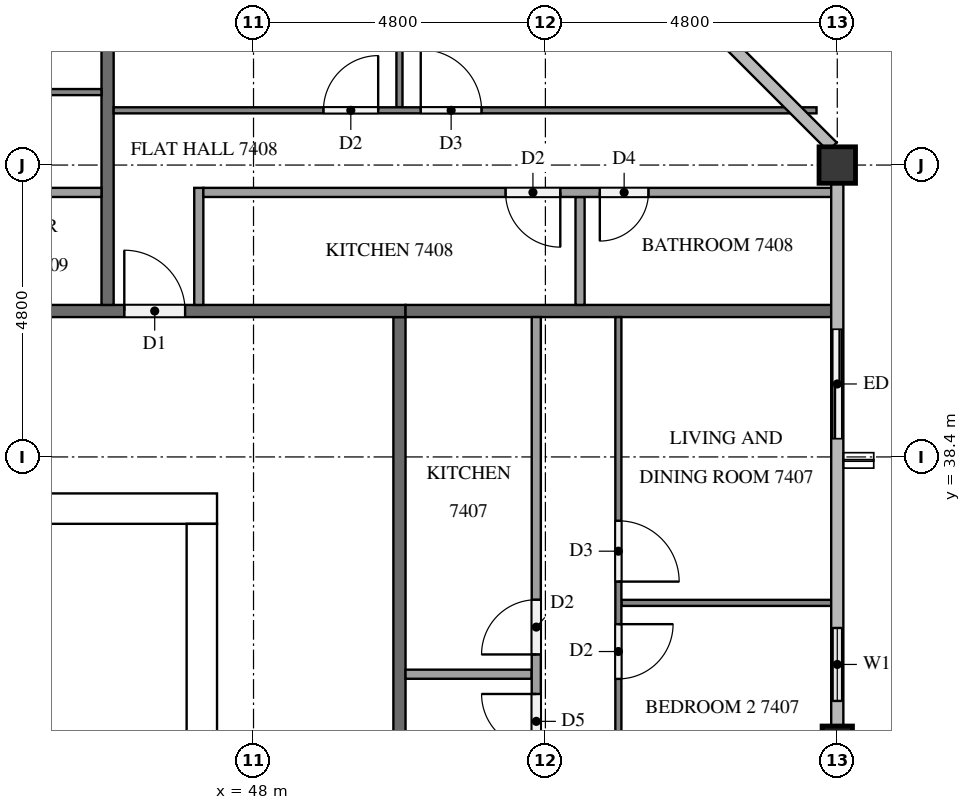
"""IFC4 building model, lengths in metres.
Left out: names, types, materials, properties, quantities, classifications, styles, units other than length and angle.
Written with IfcOpenShell. Run it as: python <this file> out.ifc"""

import sys

from ifc_helpers import new_model, si_unit, direction, frame, frame_2d, origin, origin_2d, place, context, subcontext, project, spatial, rectangle, extrude, element, fill, save


model = new_model("IFC4")
c1 = context("Model", 3, precision=1e-05, world=origin(), true_north=direction((0.0, 1.0)))
c2 = subcontext(c1, "Body", "Model", "MODEL_VIEW")
j1 = project(units=[si_unit("LENGTHUNIT", "METRE"), si_unit("PLANEANGLEUNIT", "RADIAN")], contexts=[c1])
p1 = place(None, origin())
s1 = spatial("IfcSite", under=j1, at=p1, CompositionType="ELEMENT")
p2 = place(p1, origin())
s2 = spatial("IfcBuilding", under=s1, at=p2, CompositionType="ELEMENT")
p3 = place(p2, frame((0.0, 0.0, 282.6)))
s3 = spatial("IfcBuildingStorey", under=s2, at=p3, CompositionType="ELEMENT", Elevation=282.6)
p4 = place(p3, frame((15.0, 37.55, 0.0), z_axis=(0.0, 0.0, 1.0), x_axis=(1.0, 0.0, 0.0)))
e1 = element("IfcWall", 1, at=p4, inside=s3, PredefinedType="SHEAR", context=c2, shape_type="SweptSolid", body=[
    extrude(rectangle(XDim=32.4, YDim=0.5, at=frame_2d((16.2, 0.0))), origin(), (0.0, 0.0, 1.0), 3.2),
])
p5 = place(p4, frame((15.3, 0.0, 0.0)))
e2 = element("IfcOpeningElement", 2, at=p5, cuts=e1, PredefinedType="OPENING", context=c2, shape_type="SweptSolid", body=[
    extrude(rectangle(XDim=1.8, YDim=2.1, at=frame_2d((0.9, 1.05))), frame((0.0, 0.26, 0.0), z_axis=(0.0, -1.0, 0.0), x_axis=(1.0, 0.0, 0.0)), (0.0, 0.0, 1.0), 0.52),
])
p6 = place(p4, frame((1.282, 0.0, 0.0)))
e3 = element("IfcOpeningElement", 3, at=p6, cuts=e1, PredefinedType="OPENING", context=c2, shape_type="SweptSolid", body=[
    extrude(rectangle(XDim=1.0, YDim=2.1, at=frame_2d((0.5, 1.05))), frame((0.0, 0.26, 0.0), z_axis=(0.0, -1.0, 0.0), x_axis=(1.0, 0.0, 0.0)), (0.0, 0.0, 1.0), 0.52),
])
p7 = place(p4, frame((5.082, 0.0, 0.0)))
e4 = element("IfcOpeningElement", 4, at=p7, cuts=e1, PredefinedType="OPENING", context=c2, shape_type="SweptSolid", body=[
    extrude(rectangle(XDim=1.0, YDim=2.1, at=frame_2d((0.5, 1.05))), frame((0.0, 0.26, 0.0), z_axis=(0.0, -1.0, 0.0), x_axis=(1.0, 0.0, 0.0)), (0.0, 0.0, 1.0), 0.52),
])
p8 = place(p3, frame((47.15, 15.5, 0.0), z_axis=(0.0, 0.0, 1.0), x_axis=(0.0, 1.0, 0.0)))
e5 = element("IfcWall", 5, at=p8, inside=s3, PredefinedType="SHEAR", context=c2, shape_type="SweptSolid", body=[
    extrude(rectangle(XDim=21.8, YDim=0.5, at=frame_2d((10.9, 0.0))), origin(), (0.0, 0.0, 1.0), 3.2),
])
p9 = place(p8, frame((10.6, 0.0, 0.0)))
e6 = element("IfcOpeningElement", 6, at=p9, cuts=e5, PredefinedType="OPENING", context=c2, shape_type="SweptSolid", body=[
    extrude(rectangle(XDim=1.2, YDim=2.1, at=frame_2d((0.6, 1.05))), frame((0.0, 0.26, 0.0), z_axis=(0.0, -1.0, 0.0), x_axis=(1.0, 0.0, 0.0)), (0.0, 0.0, 1.0), 0.52),
])
p10 = place(p3, frame((57.6, 33.6, 0.0), z_axis=(0.0, 0.0, 1.0), x_axis=(0.0, 1.0, 0.0)))
e7 = element("IfcColumn", 7, at=p10, inside=s3, PredefinedType="COLUMN", context=c2, shape_type="SweptSolid", body=[
    extrude(rectangle(XDim=0.75, YDim=0.5, at=origin_2d()), origin(), (0.0, 0.0, 1.0), 3.2),
])
p11 = place(p3, frame((57.6, 43.2, 0.0), z_axis=(0.0, 0.0, 1.0), x_axis=(1.0, 0.0, 0.0)))
e8 = element("IfcColumn", 8, at=p11, inside=s3, PredefinedType="COLUMN", context=c2, shape_type="SweptSolid", body=[
    extrude(rectangle(XDim=0.6, YDim=0.6, at=origin_2d()), origin(), (0.0, 0.0, 1.0), 3.2),
])
p12 = place(p3, frame((57.6, 33.975, 0.0), z_axis=(0.0, 0.0, 1.0), x_axis=(0.0, 1.0, 0.0)))
e9 = element("IfcWall", 9, at=p12, inside=s3, PredefinedType="SOLIDWALL", context=c2, shape_type="SweptSolid", body=[
    extrude(rectangle(XDim=2.025, YDim=0.15, at=frame_2d((1.012, 0.0))), origin(), (0.0, 0.0, 1.0), 3.2),
])
p13 = place(p12, frame((0.413, 0.0, 0.9)))
e10 = element("IfcOpeningElement", 10, at=p13, cuts=e9, PredefinedType="OPENING", context=c2, shape_type="SweptSolid", body=[
    extrude(rectangle(XDim=1.2, YDim=1.4, at=frame_2d((0.6, 0.7))), frame((0.0, 0.085, 0.0), z_axis=(0.0, -1.0, 0.0), x_axis=(1.0, 0.0, 0.0)), (0.0, 0.0, 1.0), 0.17),
])
p14 = place(p3, frame((57.6, 38.4, 0.0), z_axis=(0.0, 0.0, 1.0), x_axis=(0.0, 1.0, 0.0)))
e11 = element("IfcWall", 11, at=p14, inside=s3, PredefinedType="SOLIDWALL", context=c2, shape_type="SweptSolid", body=[
    extrude(rectangle(XDim=2.4, YDim=0.15, at=frame_2d((1.2, 0.0))), origin(), (0.0, 0.0, 1.0), 3.2),
])
p15 = place(p14, frame((0.3, 0.0, 0.0)))
e12 = element("IfcOpeningElement", 12, at=p15, cuts=e11, PredefinedType="OPENING", context=c2, shape_type="SweptSolid", body=[
    extrude(rectangle(XDim=1.8, YDim=2.4, at=frame_2d((0.9, 1.2))), frame((0.0, 0.085, 0.0), z_axis=(0.0, -1.0, 0.0), x_axis=(1.0, 0.0, 0.0)), (0.0, 0.0, 1.0), 0.17),
])
p16 = place(p3, frame((50.4, 40.7, 0.0), z_axis=(0.0, 0.0, 1.0), x_axis=(0.0, -1.0, 0.0)))
e13 = element("IfcWall", 13, at=p16, inside=s3, PredefinedType="PARTITIONING", context=c2, shape_type="SweptSolid", body=[
    extrude(rectangle(XDim=28.6, YDim=0.2, at=frame_2d((14.3, 0.0))), origin(), (0.0, 0.0, 1.0), 3.2),
])
p17 = place(p16, frame((27.425, 0.0, 0.0)))
e14 = element("IfcOpeningElement", 14, at=p17, cuts=e13, PredefinedType="OPENING", context=c2, shape_type="SweptSolid", body=[
    extrude(rectangle(XDim=1.0, YDim=2.1, at=frame_2d((0.5, 1.05))), frame((0.0, 0.11, 0.0), z_axis=(0.0, -1.0, 0.0), x_axis=(1.0, 0.0, 0.0)), (0.0, 0.0, 1.0), 0.22),
])
p18 = place(p16, frame((13.025, 0.0, 0.0)))
e15 = element("IfcOpeningElement", 15, at=p18, cuts=e13, PredefinedType="OPENING", context=c2, shape_type="SweptSolid", body=[
    extrude(rectangle(XDim=1.0, YDim=2.1, at=frame_2d((0.5, 1.05))), frame((0.0, 0.11, 0.0), z_axis=(0.0, -1.0, 0.0), x_axis=(1.0, 0.0, 0.0)), (0.0, 0.0, 1.0), 0.22),
])
p19 = place(p3, frame((11.9, 40.8, 0.0), z_axis=(0.0, 0.0, 1.0), x_axis=(1.0, 0.0, 0.0)))
e16 = element("IfcWall", 16, at=p19, inside=s3, PredefinedType="PARTITIONING", context=c2, shape_type="SweptSolid", body=[
    extrude(rectangle(XDim=38.6, YDim=0.2, at=frame_2d((19.3, 0.0))), origin(), (0.0, 0.0, 1.0), 3.2),
])
p20 = place(p19, frame((33.975, 0.0, 0.0)))
e17 = element("IfcOpeningElement", 17, at=p20, cuts=e16, PredefinedType="OPENING", context=c2, shape_type="SweptSolid", body=[
    extrude(rectangle(XDim=1.0, YDim=2.1, at=frame_2d((0.5, 1.05))), frame((0.0, 0.11, 0.0), z_axis=(0.0, -1.0, 0.0), x_axis=(1.0, 0.0, 0.0)), (0.0, 0.0, 1.0), 0.22),
])
p21 = place(p19, frame((14.725, 0.0, 0.0)))
e18 = element("IfcOpeningElement", 18, at=p21, cuts=e16, PredefinedType="OPENING", context=c2, shape_type="SweptSolid", body=[
    extrude(rectangle(XDim=1.1, YDim=2.1, at=frame_2d((0.55, 1.05))), frame((0.0, 0.11, 0.0), z_axis=(0.0, -1.0, 0.0), x_axis=(1.0, 0.0, 0.0)), (0.0, 0.0, 1.0), 0.22),
])
p22 = place(p19, frame((13.225, 0.0, 0.0)))
e19 = element("IfcOpeningElement", 19, at=p22, cuts=e16, PredefinedType="OPENING", context=c2, shape_type="SweptSolid", body=[
    extrude(rectangle(XDim=1.0, YDim=2.1, at=frame_2d((0.5, 1.05))), frame((0.0, 0.11, 0.0), z_axis=(0.0, -1.0, 0.0), x_axis=(1.0, 0.0, 0.0)), (0.0, 0.0, 1.0), 0.22),
])
p23 = place(p19, frame((1.225, 0.0, 0.0)))
e20 = element("IfcOpeningElement", 20, at=p23, cuts=e16, PredefinedType="OPENING", context=c2, shape_type="SweptSolid", body=[
    extrude(rectangle(XDim=1.0, YDim=2.1, at=frame_2d((0.5, 1.05))), frame((0.0, 0.11, 0.0), z_axis=(0.0, -1.0, 0.0), x_axis=(1.0, 0.0, 0.0)), (0.0, 0.0, 1.0), 0.22),
])
for number, where, z_axis, x_axis in (
    (21, (50.5, 40.8, 0.0), (0.0, 0.0, 1.0), (1.0, 0.0, 0.0)),
    (22, (45.6, 47.9, 0.0), (0.0, 0.0, 1.0), (0.0, -1.0, 0.0)),
):
    element("IfcWall", number, at=place(p3, frame(where, z_axis=z_axis, x_axis=x_axis)), inside=s3, PredefinedType="PARTITIONING", context=c2, shape_type="SweptSolid", body=[
        extrude(rectangle(XDim=7.0, YDim=0.2, at=frame_2d((3.5, 0.0))), origin(), (0.0, 0.0, 1.0), 3.2),
    ])
p24 = place(p3, frame((54.05, 36.0, 0.0), z_axis=(0.0, 0.0, 1.0), x_axis=(1.0, 0.0, 0.0)))
e23 = element("IfcWall", 23, at=p24, inside=s3, PredefinedType="PARTITIONING", context=c2, shape_type="SweptSolid", body=[
    extrude(rectangle(XDim=3.45, YDim=0.1, at=frame_2d((1.725, 0.0))), origin(), (0.0, 0.0, 1.0), 3.2),
])
p25 = place(p3, frame((54.0, 40.7, 0.0), z_axis=(0.0, 0.0, 1.0), x_axis=(0.0, -1.0, 0.0)))
e24 = element("IfcWall", 24, at=p25, inside=s3, PredefinedType="PARTITIONING", context=c2, shape_type="SweptSolid", body=[
    extrude(rectangle(XDim=14.2, YDim=0.1, at=frame_2d((7.1, 0.0))), origin(), (0.0, 0.0, 1.0), 3.2),
])
p26 = place(p25, frame((13.0, 0.0, 0.0)))
e25 = element("IfcOpeningElement", 25, at=p26, cuts=e24, PredefinedType="OPENING", context=c2, shape_type="SweptSolid", body=[
    extrude(rectangle(XDim=0.9, YDim=2.1, at=frame_2d((0.45, 1.05))), frame((0.0, 0.06, 0.0), z_axis=(0.0, -1.0, 0.0), x_axis=(1.0, 0.0, 0.0)), (0.0, 0.0, 1.0), 0.12),
])
p27 = place(p25, frame((5.05, 0.0, 0.0)))
e26 = element("IfcOpeningElement", 26, at=p27, cuts=e24, PredefinedType="OPENING", context=c2, shape_type="SweptSolid", body=[
    extrude(rectangle(XDim=0.9, YDim=2.1, at=frame_2d((0.45, 1.05))), frame((0.0, 0.06, 0.0), z_axis=(0.0, -1.0, 0.0), x_axis=(1.0, 0.0, 0.0)), (0.0, 0.0, 1.0), 0.12),
])
p28 = place(p25, frame((3.35, 0.0, 0.0)))
e27 = element("IfcOpeningElement", 27, at=p28, cuts=e24, PredefinedType="OPENING", context=c2, shape_type="SweptSolid", body=[
    extrude(rectangle(XDim=1.0, YDim=2.1, at=frame_2d((0.5, 1.05))), frame((0.0, 0.06, 0.0), z_axis=(0.0, -1.0, 0.0), x_axis=(1.0, 0.0, 0.0)), (0.0, 0.0, 1.0), 0.12),
])
p29 = place(p3, frame((50.5, 34.827, 0.0), z_axis=(0.0, 0.0, 1.0), x_axis=(1.0, 0.0, 0.0)))
e28 = element("IfcWall", 28, at=p29, inside=s3, PredefinedType="PARTITIONING", context=c2, shape_type="SweptSolid", body=[
    extrude(rectangle(XDim=2.075, YDim=0.15, at=frame_2d((1.038, 0.0))), origin(), (0.0, 0.0, 1.0), 3.2),
])
p30 = place(p3, frame((52.65, 27.975, 0.0), z_axis=(0.0, 0.0, 1.0), x_axis=(0.0, 1.0, 0.0)))
e29 = element("IfcWall", 29, at=p30, inside=s3, PredefinedType="PARTITIONING", context=c2, shape_type="SweptSolid", body=[
    extrude(rectangle(XDim=12.725, YDim=0.15, at=frame_2d((6.362, 0.0))), origin(), (0.0, 0.0, 1.0), 3.2),
])
p31 = place(p30, frame((0.3, 0.0, 0.0)))
e30 = element("IfcOpeningElement", 30, at=p31, cuts=e29, PredefinedType="OPENING", context=c2, shape_type="SweptSolid", body=[
    extrude(rectangle(XDim=0.8, YDim=2.1, at=frame_2d((0.4, 1.05))), frame((0.0, 0.085, 0.0), z_axis=(0.0, -1.0, 0.0), x_axis=(1.0, 0.0, 0.0)), (0.0, 0.0, 1.0), 0.17),
])
p32 = place(p30, frame((5.627, 0.0, 0.0)))
e31 = element("IfcOpeningElement", 31, at=p32, cuts=e29, PredefinedType="OPENING", context=c2, shape_type="SweptSolid", body=[
    extrude(rectangle(XDim=0.9, YDim=2.1, at=frame_2d((0.45, 1.05))), frame((0.0, 0.085, 0.0), z_axis=(0.0, -1.0, 0.0), x_axis=(1.0, 0.0, 0.0)), (0.0, 0.0, 1.0), 0.17),
])
p33 = place(p30, frame((7.177, 0.0, 0.0)))
e32 = element("IfcOpeningElement", 32, at=p33, cuts=e29, PredefinedType="OPENING", context=c2, shape_type="SweptSolid", body=[
    extrude(rectangle(XDim=0.9, YDim=2.1, at=frame_2d((0.45, 1.05))), frame((0.0, 0.085, 0.0), z_axis=(0.0, -1.0, 0.0), x_axis=(1.0, 0.0, 0.0)), (0.0, 0.0, 1.0), 0.17),
])
p34 = place(p3, frame((50.4, 44.15, 0.0), z_axis=(0.0, 0.0, 1.0), x_axis=(0.0, 1.0, 0.0)))
e33 = element("IfcWall", 33, at=p34, inside=s3, PredefinedType="PARTITIONING", context=c2, shape_type="SweptSolid", body=[
    extrude(rectangle(XDim=3.75, YDim=0.1, at=frame_2d((1.875, 0.0))), origin(), (0.0, 0.0, 1.0), 3.2),
])
p35 = place(p3, frame((45.7, 44.1, 0.0), z_axis=(0.0, 0.0, 1.0), x_axis=(1.0, 0.0, 0.0)))
e34 = element("IfcWall", 34, at=p35, inside=s3, PredefinedType="PARTITIONING", context=c2, shape_type="SweptSolid", body=[
    extrude(rectangle(XDim=11.559, YDim=0.1, at=frame_2d((5.779, 0.0))), origin(), (0.0, 0.0, 1.0), 3.2),
])
p36 = place(p35, frame((3.45, 0.0, 0.0)))
e35 = element("IfcOpeningElement", 35, at=p36, cuts=e34, PredefinedType="OPENING", context=c2, shape_type="SweptSolid", body=[
    extrude(rectangle(XDim=0.9, YDim=2.1, at=frame_2d((0.45, 1.05))), frame((0.0, 0.06, 0.0), z_axis=(0.0, -1.0, 0.0), x_axis=(1.0, 0.0, 0.0)), (0.0, 0.0, 1.0), 0.12),
])
p37 = place(p35, frame((5.05, 0.0, 0.0)))
e36 = element("IfcOpeningElement", 36, at=p37, cuts=e34, PredefinedType="OPENING", context=c2, shape_type="SweptSolid", body=[
    extrude(rectangle(XDim=1.0, YDim=2.1, at=frame_2d((0.5, 1.05))), frame((0.0, 0.06, 0.0), z_axis=(0.0, -1.0, 0.0), x_axis=(1.0, 0.0, 0.0)), (0.0, 0.0, 1.0), 0.12),
])
p38 = place(p3, frame((53.37, 40.9, 0.0), z_axis=(0.0, 0.0, 1.0), x_axis=(0.0, 1.0, 0.0)))
e37 = element("IfcWall", 37, at=p38, inside=s3, PredefinedType="PARTITIONING", context=c2, shape_type="SweptSolid", body=[
    extrude(rectangle(XDim=1.775, YDim=0.15, at=frame_2d((0.888, 0.0))), origin(), (0.0, 0.0, 1.0), 3.2),
])
p39 = place(p3, frame((47.1, 40.9, 0.0), z_axis=(0.0, 0.0, 1.0), x_axis=(0.0, 1.0, 0.0)))
e38 = element("IfcWall", 38, at=p39, inside=s3, PredefinedType="PARTITIONING", context=c2, shape_type="SweptSolid", body=[
    extrude(rectangle(XDim=1.925, YDim=0.15, at=frame_2d((0.962, 0.0))), origin(), (0.0, 0.0, 1.0), 3.2),
])
p40 = place(p3, frame((57.5, 42.75, 0.0), z_axis=(0.0, 0.0, 1.0), x_axis=(-1.0, 0.0, 0.0)))
e39 = element("IfcWall", 39, at=p40, inside=s3, PredefinedType="PARTITIONING", context=c2, shape_type="SweptSolid", body=[
    extrude(rectangle(XDim=10.325, YDim=0.15, at=frame_2d((5.163, 0.0))), origin(), (0.0, 0.0, 1.0), 3.2),
])
p41 = place(p40, frame((4.455, 0.0, 0.0)))
e40 = element("IfcOpeningElement", 40, at=p41, cuts=e39, PredefinedType="OPENING", context=c2, shape_type="SweptSolid", body=[
    extrude(rectangle(XDim=0.9, YDim=2.1, at=frame_2d((0.45, 1.05))), frame((0.0, 0.085, 0.0), z_axis=(0.0, -1.0, 0.0), x_axis=(1.0, 0.0, 0.0)), (0.0, 0.0, 1.0), 0.17),
])
p42 = place(p40, frame((3.005, 0.0, 0.0)))
e41 = element("IfcOpeningElement", 41, at=p42, cuts=e39, PredefinedType="OPENING", context=c2, shape_type="SweptSolid", body=[
    extrude(rectangle(XDim=0.8, YDim=2.1, at=frame_2d((0.4, 1.05))), frame((0.0, 0.085, 0.0), z_axis=(0.0, -1.0, 0.0), x_axis=(1.0, 0.0, 0.0)), (0.0, 0.0, 1.0), 0.17),
])
p43 = place(p3, frame((26.5, 44.4, 0.0), z_axis=(0.0, 0.0, 1.0), x_axis=(1.0, 0.0, 0.0)))
e42 = element("IfcWall", 42, at=p43, inside=s3, PredefinedType="PARTITIONING", context=c2, shape_type="SweptSolid", body=[
    extrude(rectangle(XDim=19.0, YDim=0.1, at=frame_2d((9.5, 0.0))), origin(), (0.0, 0.0, 1.0), 3.2),
])
p44 = place(p43, frame((3.45, 0.0, 0.0)))
e43 = element("IfcOpeningElement", 43, at=p44, cuts=e42, PredefinedType="OPENING", context=c2, shape_type="SweptSolid", body=[
    extrude(rectangle(XDim=0.9, YDim=2.1, at=frame_2d((0.45, 1.05))), frame((0.0, 0.06, 0.0), z_axis=(0.0, -1.0, 0.0), x_axis=(1.0, 0.0, 0.0)), (0.0, 0.0, 1.0), 0.12),
])
p45 = place(p43, frame((5.05, 0.0, 0.0)))
e44 = element("IfcOpeningElement", 44, at=p45, cuts=e42, PredefinedType="OPENING", context=c2, shape_type="SweptSolid", body=[
    extrude(rectangle(XDim=0.9, YDim=2.1, at=frame_2d((0.45, 1.05))), frame((0.0, 0.06, 0.0), z_axis=(0.0, -1.0, 0.0), x_axis=(1.0, 0.0, 0.0)), (0.0, 0.0, 1.0), 0.12),
])
p46 = place(p43, frame((12.95, 0.0, 0.0)))
e45 = element("IfcOpeningElement", 45, at=p46, cuts=e42, PredefinedType="OPENING", context=c2, shape_type="SweptSolid", body=[
    extrude(rectangle(XDim=1.0, YDim=2.1, at=frame_2d((0.5, 1.05))), frame((0.0, 0.06, 0.0), z_axis=(0.0, -1.0, 0.0), x_axis=(1.0, 0.0, 0.0)), (0.0, 0.0, 1.0), 0.12),
])
p47 = place(p43, frame((14.65, 0.0, 0.0)))
e46 = element("IfcOpeningElement", 46, at=p47, cuts=e42, PredefinedType="OPENING", context=c2, shape_type="SweptSolid", body=[
    extrude(rectangle(XDim=0.9, YDim=2.1, at=frame_2d((0.45, 1.05))), frame((0.0, 0.06, 0.0), z_axis=(0.0, -1.0, 0.0), x_axis=(1.0, 0.0, 0.0)), (0.0, 0.0, 1.0), 0.12),
])
p48 = place(p3, frame((45.5, 42.75, 0.0), z_axis=(0.0, 0.0, 1.0), x_axis=(-1.0, 0.0, 0.0)))
e47 = element("IfcWall", 47, at=p48, inside=s3, PredefinedType="PARTITIONING", context=c2, shape_type="SweptSolid", body=[
    extrude(rectangle(XDim=17.525, YDim=0.15, at=frame_2d((8.762, 0.0))), origin(), (0.0, 0.0, 1.0), 3.2),
])
p49 = place(p48, frame((13.469, 0.0, 0.0)))
e48 = element("IfcOpeningElement", 48, at=p49, cuts=e47, PredefinedType="OPENING", context=c2, shape_type="SweptSolid", body=[
    extrude(rectangle(XDim=0.9, YDim=2.1, at=frame_2d((0.45, 1.05))), frame((0.0, 0.085, 0.0), z_axis=(0.0, -1.0, 0.0), x_axis=(1.0, 0.0, 0.0)), (0.0, 0.0, 1.0), 0.17),
])
p50 = place(p48, frame((11.919, 0.0, 0.0)))
e49 = element("IfcOpeningElement", 49, at=p50, cuts=e47, PredefinedType="OPENING", context=c2, shape_type="SweptSolid", body=[
    extrude(rectangle(XDim=0.9, YDim=2.1, at=frame_2d((0.45, 1.05))), frame((0.0, 0.085, 0.0), z_axis=(0.0, -1.0, 0.0), x_axis=(1.0, 0.0, 0.0)), (0.0, 0.0, 1.0), 0.17),
])
p51 = place(p48, frame((3.611, 0.0, 0.0)))
e50 = element("IfcOpeningElement", 50, at=p51, cuts=e47, PredefinedType="OPENING", context=c2, shape_type="SweptSolid", body=[
    extrude(rectangle(XDim=0.8, YDim=2.1, at=frame_2d((0.4, 1.05))), frame((0.0, 0.085, 0.0), z_axis=(0.0, -1.0, 0.0), x_axis=(1.0, 0.0, 0.0)), (0.0, 0.0, 1.0), 0.17),
])
p52 = place(p48, frame((2.161, 0.0, 0.0)))
e51 = element("IfcOpeningElement", 51, at=p52, cuts=e47, PredefinedType="OPENING", context=c2, shape_type="SweptSolid", body=[
    extrude(rectangle(XDim=0.8, YDim=2.1, at=frame_2d((0.4, 1.05))), frame((0.0, 0.085, 0.0), z_axis=(0.0, -1.0, 0.0), x_axis=(1.0, 0.0, 0.0)), (0.0, 0.0, 1.0), 0.17),
])
p53 = place(p13, origin())
e52 = element("IfcWindow", 52, at=p53, inside=s3, PartitioningType="SINGLE_PANEL", PredefinedType="WINDOW", context=c2, shape_type="SweptSolid", body=[
    extrude(rectangle(XDim=1.2, YDim=1.4, at=frame_2d((0.6, 0.7))), frame((0.0, 0.03, 0.0), z_axis=(0.0, -1.0, 0.0), x_axis=(1.0, 0.0, 0.0)), (0.0, 0.0, 1.0), 0.06),
])
fill(e10, e52)
p54 = place(p15, origin())
e53 = element("IfcDoor", 53, at=p54, inside=s3, OperationType="SLIDING_TO_RIGHT", PredefinedType="DOOR", context=c2, shape_type="SweptSolid", body=[
    extrude(rectangle(XDim=1.8, YDim=2.4, at=frame_2d((0.9, 1.2))), frame((0.0, 0.025, 0.0), z_axis=(0.0, -1.0, 0.0), x_axis=(1.0, 0.0, 0.0)), (0.0, 0.0, 1.0), 0.05),
])
fill(e12, e53)
p55 = place(p20, origin())
e54 = element("IfcDoor", 54, at=p55, inside=s3, OperationType="SINGLE_SWING_LEFT", PredefinedType="DOOR", context=c2, shape_type="SweptSolid", body=[
    extrude(rectangle(XDim=1.0, YDim=2.1, at=frame_2d((0.5, 1.05))), frame((0.0, 0.025, 0.0), z_axis=(0.0, -1.0, 0.0), x_axis=(1.0, 0.0, 0.0)), (0.0, 0.0, 1.0), 0.05),
])
fill(e17, e54)
p56 = place(p27, origin())
e55 = element("IfcDoor", 55, at=p56, inside=s3, OperationType="SINGLE_SWING_LEFT", PredefinedType="DOOR", context=c2, shape_type="SweptSolid", body=[
    extrude(rectangle(XDim=0.9, YDim=2.1, at=frame_2d((0.45, 1.05))), frame((0.0, 0.025, 0.0), z_axis=(0.0, -1.0, 0.0), x_axis=(1.0, 0.0, 0.0)), (0.0, 0.0, 1.0), 0.05),
])
fill(e26, e55)
p57 = place(p28, origin())
e56 = element("IfcDoor", 56, at=p57, inside=s3, OperationType="SINGLE_SWING_RIGHT", PredefinedType="DOOR", context=c2, shape_type="SweptSolid", body=[
    extrude(rectangle(XDim=1.0, YDim=2.1, at=frame_2d((0.5, 1.05))), frame((0.0, 0.025, 0.0), z_axis=(0.0, -1.0, 0.0), x_axis=(1.0, 0.0, 0.0)), (0.0, 0.0, 1.0), 0.05),
])
fill(e27, e56)
p58 = place(p32, origin())
e57 = element("IfcDoor", 57, at=p58, inside=s3, OperationType="SINGLE_SWING_RIGHT", PredefinedType="DOOR", context=c2, shape_type="SweptSolid", body=[
    extrude(rectangle(XDim=0.9, YDim=2.1, at=frame_2d((0.45, 1.05))), frame((0.0, 0.025, 0.0), z_axis=(0.0, -1.0, 0.0), x_axis=(1.0, 0.0, 0.0)), (0.0, 0.0, 1.0), 0.05),
])
fill(e31, e57)
p59 = place(p33, origin())
e58 = element("IfcDoor", 58, at=p59, inside=s3, OperationType="SINGLE_SWING_LEFT", PredefinedType="DOOR", context=c2, shape_type="SweptSolid", body=[
    extrude(rectangle(XDim=0.9, YDim=2.1, at=frame_2d((0.45, 1.05))), frame((0.0, 0.025, 0.0), z_axis=(0.0, -1.0, 0.0), x_axis=(1.0, 0.0, 0.0)), (0.0, 0.0, 1.0), 0.05),
])
fill(e32, e58)
p60 = place(p36, origin())
e59 = element("IfcDoor", 59, at=p60, inside=s3, OperationType="SINGLE_SWING_RIGHT", PredefinedType="DOOR", context=c2, shape_type="SweptSolid", body=[
    extrude(rectangle(XDim=0.9, YDim=2.1, at=frame_2d((0.45, 1.05))), frame((0.0, 0.025, 0.0), z_axis=(0.0, -1.0, 0.0), x_axis=(1.0, 0.0, 0.0)), (0.0, 0.0, 1.0), 0.05),
])
fill(e35, e59)
p61 = place(p37, origin())
e60 = element("IfcDoor", 60, at=p61, inside=s3, OperationType="SINGLE_SWING_LEFT", PredefinedType="DOOR", context=c2, shape_type="SweptSolid", body=[
    extrude(rectangle(XDim=1.0, YDim=2.1, at=frame_2d((0.5, 1.05))), frame((0.0, 0.025, 0.0), z_axis=(0.0, -1.0, 0.0), x_axis=(1.0, 0.0, 0.0)), (0.0, 0.0, 1.0), 0.05),
])
fill(e36, e60)
p62 = place(p41, origin())
e61 = element("IfcDoor", 61, at=p62, inside=s3, OperationType="SINGLE_SWING_LEFT", PredefinedType="DOOR", context=c2, shape_type="SweptSolid", body=[
    extrude(rectangle(XDim=0.9, YDim=2.1, at=frame_2d((0.45, 1.05))), frame((0.0, 0.025, 0.0), z_axis=(0.0, -1.0, 0.0), x_axis=(1.0, 0.0, 0.0)), (0.0, 0.0, 1.0), 0.05),
])
fill(e40, e61)
p63 = place(p42, origin())
e62 = element("IfcDoor", 62, at=p63, inside=s3, OperationType="SINGLE_SWING_RIGHT", PredefinedType="DOOR", context=c2, shape_type="SweptSolid", body=[
    extrude(rectangle(XDim=0.8, YDim=2.1, at=frame_2d((0.4, 1.05))), frame((0.0, 0.025, 0.0), z_axis=(0.0, -1.0, 0.0), x_axis=(1.0, 0.0, 0.0)), (0.0, 0.0, 1.0), 0.05),
])
fill(e41, e62)
save(model, sys.argv[1])
